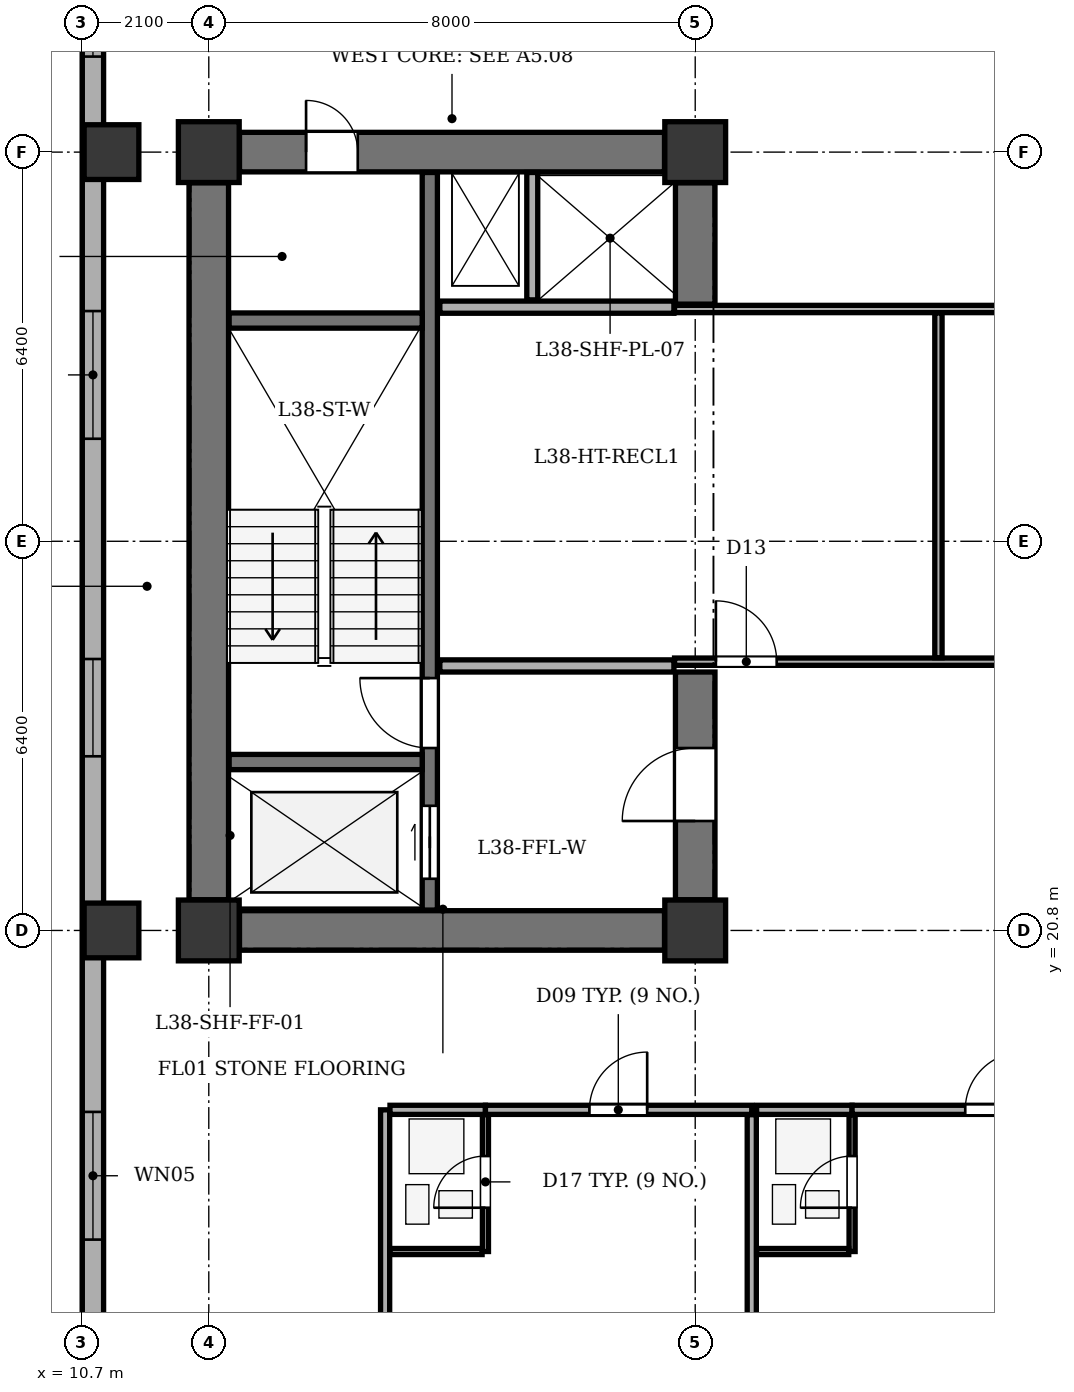
"""IFC4 building model, lengths in metres.
Left out: names, types, materials, properties, quantities, classifications, styles, units other than length and angle.
Written with IfcOpenShell. Run it as: python <this file> out.ifc"""

import sys

from ifc_helpers import new_model, si_unit, direction, frame, frame_2d, origin, origin_2d, place, context, subcontext, project, spatial, rectangle, extrude, element, fill, save


model = new_model("IFC4")
c1 = context("Model", 3, precision=1e-05, world=origin(), true_north=direction((0.0, 1.0)))
c2 = subcontext(c1, "Body", "Model", "MODEL_VIEW")
j1 = project(units=[si_unit("LENGTHUNIT", "METRE"), si_unit("PLANEANGLEUNIT", "RADIAN")], contexts=[c1])
p1 = place(None, origin())
s1 = spatial("IfcSite", under=j1, at=p1, CompositionType="ELEMENT")
p2 = place(p1, origin())
s2 = spatial("IfcBuilding", under=s1, at=p2, CompositionType="ELEMENT")
p3 = place(p2, frame((0.0, 0.0, 151.8)))
s3 = spatial("IfcBuildingStorey", under=s2, at=p3, CompositionType="ELEMENT", Elevation=151.8)
for number, where, z_axis, x_axis in (
    (1, (12.8, 20.8, 0.0), (0.0, 0.0, 1.0), (1.0, 0.0, 0.0)),
    (2, (20.8, 20.8, 0.0), (0.0, 0.0, 1.0), (1.0, 0.0, 0.0)),
    (3, (12.8, 33.6, 0.0), (0.0, 0.0, 1.0), (1.0, 0.0, 0.0)),
    (4, (20.8, 33.6, 0.0), (0.0, 0.0, 1.0), (1.0, 0.0, 0.0)),
):
    element("IfcColumn", number, at=place(p3, frame(where, z_axis=z_axis, x_axis=x_axis)), inside=s3, PredefinedType="COLUMN", context=c2, shape_type="SweptSolid", body=[
        extrude(rectangle(XDim=1.0, YDim=1.0, at=origin_2d()), origin(), (0.0, 0.0, 1.0), 3.5),
    ])
for number, where, z_axis, x_axis in (
    (5, (11.2, 20.8, 0.0), (0.0, 0.0, 1.0), (1.0, 0.0, 0.0)),
    (6, (11.2, 33.6, 0.0), (0.0, 0.0, 1.0), (1.0, 0.0, 0.0)),
):
    element("IfcColumn", number, at=place(p3, frame(where, z_axis=z_axis, x_axis=x_axis)), inside=s3, PredefinedType="COLUMN", context=c2, shape_type="SweptSolid", body=[
        extrude(rectangle(XDim=0.9, YDim=0.9, at=origin_2d()), origin(), (0.0, 0.0, 1.0), 3.5),
    ])
p4 = place(p3, frame((10.895, 6.5, 0.0), z_axis=(0.0, 0.0, 1.0), x_axis=(0.0, 1.0, 0.0)))
e7 = element("IfcWall", 7, at=p4, inside=s3, PredefinedType="STANDARD", context=c2, shape_type="SweptSolid", body=[
    extrude(rectangle(XDim=35.0, YDim=0.35, at=frame_2d((17.5, 0.0))), origin(), (0.0, 0.0, 1.0), 2.785),
])
p5 = place(p4, frame((3.31, 0.0, 0.75)))
e8 = element("IfcOpeningElement", 8, at=p5, cuts=e7, PredefinedType="OPENING", context=c2, shape_type="SweptSolid", body=[
    extrude(rectangle(XDim=1.6, YDim=1.75, at=frame_2d((0.8, 0.875))), frame((0.0, 0.185, 0.0), z_axis=(0.0, -1.0, 0.0), x_axis=(1.0, 0.0, 0.0)), (0.0, 0.0, 1.0), 0.37),
])
p6 = place(p4, frame((9.216, 0.0, 0.75)))
e9 = element("IfcOpeningElement", 9, at=p6, cuts=e7, PredefinedType="OPENING", context=c2, shape_type="SweptSolid", body=[
    extrude(rectangle(XDim=2.1, YDim=1.75, at=frame_2d((1.05, 0.875))), frame((0.0, 0.185, 0.0), z_axis=(0.0, -1.0, 0.0), x_axis=(1.0, 0.0, 0.0)), (0.0, 0.0, 1.0), 0.37),
])
p7 = place(p4, frame((17.164, 0.0, 0.75)))
e10 = element("IfcOpeningElement", 10, at=p7, cuts=e7, PredefinedType="OPENING", context=c2, shape_type="SweptSolid", body=[
    extrude(rectangle(XDim=1.6, YDim=1.75, at=frame_2d((0.8, 0.875))), frame((0.0, 0.185, 0.0), z_axis=(0.0, -1.0, 0.0), x_axis=(1.0, 0.0, 0.0)), (0.0, 0.0, 1.0), 0.37),
])
p8 = place(p4, frame((22.386, 0.0, 0.75)))
e11 = element("IfcOpeningElement", 11, at=p8, cuts=e7, PredefinedType="OPENING", context=c2, shape_type="SweptSolid", body=[
    extrude(rectangle(XDim=2.1, YDim=1.75, at=frame_2d((1.05, 0.875))), frame((0.0, 0.185, 0.0), z_axis=(0.0, -1.0, 0.0), x_axis=(1.0, 0.0, 0.0)), (0.0, 0.0, 1.0), 0.37),
])
p9 = place(p4, frame((28.671, 0.0, 0.75)))
e12 = element("IfcOpeningElement", 12, at=p9, cuts=e7, PredefinedType="OPENING", context=c2, shape_type="SweptSolid", body=[
    extrude(rectangle(XDim=1.6, YDim=1.75, at=frame_2d((0.8, 0.875))), frame((0.0, 0.185, 0.0), z_axis=(0.0, -1.0, 0.0), x_axis=(1.0, 0.0, 0.0)), (0.0, 0.0, 1.0), 0.37),
])
p10 = place(p4, frame((31.755, 0.0, 0.75)))
e13 = element("IfcOpeningElement", 13, at=p10, cuts=e7, PredefinedType="OPENING", context=c2, shape_type="SweptSolid", body=[
    extrude(rectangle(XDim=1.6, YDim=1.75, at=frame_2d((0.8, 0.875))), frame((0.0, 0.185, 0.0), z_axis=(0.0, -1.0, 0.0), x_axis=(1.0, 0.0, 0.0)), (0.0, 0.0, 1.0), 0.37),
])
p11 = place(p3, frame((12.8, 21.305, 0.0), z_axis=(0.0, 0.0, 1.0), x_axis=(0.0, 1.0, 0.0)))
e14 = element("IfcWall", 14, at=p11, inside=s3, PredefinedType="SHEAR", context=c2, shape_type="SweptSolid", body=[
    extrude(rectangle(XDim=11.79, YDim=0.65, at=frame_2d((5.895, 0.0))), origin(), (0.0, 0.0, 1.0), 3.2),
])
p12 = place(p3, frame((13.305, 20.8, 0.0), z_axis=(0.0, 0.0, 1.0), x_axis=(1.0, 0.0, 0.0)))
e15 = element("IfcWall", 15, at=p12, inside=s3, PredefinedType="SHEAR", context=c2, shape_type="SweptSolid", body=[
    extrude(rectangle(XDim=6.99, YDim=0.65, at=frame_2d((3.495, 0.0))), origin(), (0.0, 0.0, 1.0), 3.2),
])
p13 = place(p3, frame((13.305, 33.6, 0.0), z_axis=(0.0, 0.0, 1.0), x_axis=(1.0, 0.0, 0.0)))
e16 = element("IfcWall", 16, at=p13, inside=s3, PredefinedType="SHEAR", context=c2, shape_type="SweptSolid", body=[
    extrude(rectangle(XDim=6.99, YDim=0.65, at=frame_2d((3.495, 0.0))), origin(), (0.0, 0.0, 1.0), 3.2),
])
p14 = place(p13, frame((1.095, 0.0, 0.0)))
e17 = element("IfcOpeningElement", 17, at=p14, cuts=e16, PredefinedType="OPENING", context=c2, shape_type="SweptSolid", body=[
    extrude(rectangle(XDim=0.85, YDim=2.02, at=frame_2d((0.425, 1.01))), frame((0.0, 0.335, 0.0), z_axis=(0.0, -1.0, 0.0), x_axis=(1.0, 0.0, 0.0)), (0.0, 0.0, 1.0), 0.67),
])
p15 = place(p3, frame((20.8, 21.305, 0.0), z_axis=(0.0, 0.0, 1.0), x_axis=(0.0, 1.0, 0.0)))
e18 = element("IfcWall", 18, at=p15, inside=s3, PredefinedType="SHEAR", context=c2, shape_type="SweptSolid", body=[
    extrude(rectangle(XDim=3.745, YDim=0.65, at=frame_2d((1.873, 0.0))), origin(), (0.0, 0.0, 1.0), 3.2),
])
p16 = place(p15, frame((1.295, 0.0, 0.0)))
e19 = element("IfcOpeningElement", 19, at=p16, cuts=e18, PredefinedType="OPENING", context=c2, shape_type="SweptSolid", body=[
    extrude(rectangle(XDim=1.2, YDim=2.15, at=frame_2d((0.6, 1.075))), frame((0.0, 0.335, 0.0), z_axis=(0.0, -1.0, 0.0), x_axis=(1.0, 0.0, 0.0)), (0.0, 0.0, 1.0), 0.67),
])
p17 = place(p3, frame((20.8, 31.1, 0.0), z_axis=(0.0, 0.0, 1.0), x_axis=(0.0, 1.0, 0.0)))
e20 = element("IfcWall", 20, at=p17, inside=s3, PredefinedType="SHEAR", context=c2, shape_type="SweptSolid", body=[
    extrude(rectangle(XDim=1.995, YDim=0.65, at=frame_2d((0.998, 0.0))), origin(), (0.0, 0.0, 1.0), 3.2),
])
p18 = place(p3, frame((16.435, 21.135, 0.0), z_axis=(0.0, 0.0, 1.0), x_axis=(0.0, 1.0, 0.0)))
e21 = element("IfcWall", 21, at=p18, inside=s3, PredefinedType="SHEAR", context=c2, shape_type="SweptSolid", body=[
    extrude(rectangle(XDim=12.13, YDim=0.25, at=frame_2d((6.065, 0.0))), origin(), (0.0, 0.0, 1.0), 3.2),
])
p19 = place(p18, frame((0.515, 0.0, 0.0)))
e22 = element("IfcOpeningElement", 22, at=p19, cuts=e21, PredefinedType="OPENING", context=c2, shape_type="SweptSolid", body=[
    extrude(rectangle(XDim=1.2, YDim=2.15, at=frame_2d((0.6, 1.075))), frame((0.0, 0.135, 0.0), z_axis=(0.0, -1.0, 0.0), x_axis=(1.0, 0.0, 0.0)), (0.0, 0.0, 1.0), 0.27),
])
p20 = place(p18, frame((2.665, 0.0, 0.0)))
e23 = element("IfcOpeningElement", 23, at=p20, cuts=e21, PredefinedType="OPENING", context=c2, shape_type="SweptSolid", body=[
    extrude(rectangle(XDim=1.15, YDim=2.15, at=frame_2d((0.575, 1.075))), frame((0.0, 0.135, 0.0), z_axis=(0.0, -1.0, 0.0), x_axis=(1.0, 0.0, 0.0)), (0.0, 0.0, 1.0), 0.27),
])
for number, where, z_axis, x_axis in (
    (24, (13.135, 23.57, 0.0), (0.0, 0.0, 1.0), (1.0, 0.0, 0.0)),
    (25, (13.135, 30.83, 0.0), (0.0, 0.0, 1.0), (1.0, 0.0, 0.0)),
):
    element("IfcWall", number, at=place(p3, frame(where, z_axis=z_axis, x_axis=x_axis)), inside=s3, PredefinedType="SHEAR", context=c2, shape_type="SweptSolid", body=[
        extrude(rectangle(XDim=3.175, YDim=0.25, at=frame_2d((1.587, 0.0))), origin(), (0.0, 0.0, 1.0), 3.2),
    ])
for number, where, z_axis, x_axis in (
    (26, (16.6, 25.15, 0.0), (0.0, 0.0, 1.0), (1.0, 0.0, 0.0)),
    (27, (16.6, 31.05, 0.0), (0.0, 0.0, 1.0), (1.0, 0.0, 0.0)),
):
    element("IfcWall", number, at=place(p3, frame(where, z_axis=z_axis, x_axis=x_axis)), inside=s3, PredefinedType="SOLIDWALL", context=c2, shape_type="SweptSolid", body=[
        extrude(rectangle(XDim=3.85, YDim=0.2, at=frame_2d((1.925, 0.0))), origin(), (0.0, 0.0, 1.0), 3.2),
    ])
p21 = place(p3, frame((18.12, 31.17, 0.0), z_axis=(0.0, 0.0, 1.0), x_axis=(0.0, 1.0, 0.0)))
e28 = element("IfcWall", 28, at=p21, inside=s3, PredefinedType="PARTITIONING", context=c2, shape_type="SweptSolid", body=[
    extrude(rectangle(XDim=2.095, YDim=0.18, at=frame_2d((1.047, 0.0))), origin(), (0.0, 0.0, 1.0), 3.2),
])
p22 = place(p3, frame((20.46, 25.22, 0.0), z_axis=(0.0, 0.0, 1.0), x_axis=(1.0, 0.0, 0.0)))
e29 = element("IfcWall", 29, at=p22, inside=s3, PredefinedType="PARTITIONING", context=c2, shape_type="SweptSolid", body=[
    extrude(rectangle(XDim=11.94, YDim=0.12, at=frame_2d((5.97, 0.0))), origin(), (0.0, 0.0, 1.0), 3.2),
])
p23 = place(p22, frame((0.68, 0.0, 0.0)))
e30 = element("IfcOpeningElement", 30, at=p23, cuts=e29, PredefinedType="OPENING", context=c2, shape_type="SweptSolid", body=[
    extrude(rectangle(XDim=1.0, YDim=2.1, at=frame_2d((0.5, 1.05))), frame((0.0, 0.07, 0.0), z_axis=(0.0, -1.0, 0.0), x_axis=(1.0, 0.0, 0.0)), (0.0, 0.0, 1.0), 0.14),
])
p24 = place(p3, frame((20.46, 31.02, 0.0), z_axis=(0.0, 0.0, 1.0), x_axis=(1.0, 0.0, 0.0)))
e31 = element("IfcWall", 31, at=p24, inside=s3, PredefinedType="PARTITIONING", context=c2, shape_type="SweptSolid", body=[
    extrude(rectangle(XDim=11.94, YDim=0.12, at=frame_2d((5.97, 0.0))), origin(), (0.0, 0.0, 1.0), 3.2),
])
p25 = place(p3, frame((24.8, 25.285, 0.0), z_axis=(0.0, 0.0, 1.0), x_axis=(0.0, 1.0, 0.0)))
e32 = element("IfcWall", 32, at=p25, inside=s3, PredefinedType="PARTITIONING", context=c2, shape_type="SweptSolid", body=[
    extrude(rectangle(XDim=5.67, YDim=0.12, at=frame_2d((2.835, 0.0))), origin(), (0.0, 0.0, 1.0), 3.2),
])
p26 = place(p3, frame((15.7, 1.875, 0.0), z_axis=(0.0, 0.0, 1.0), x_axis=(0.0, 1.0, 0.0)))
e33 = element("IfcWall", 33, at=p26, inside=s3, PredefinedType="PARTITIONING", context=c2, shape_type="SweptSolid", body=[
    extrude(rectangle(XDim=15.975, YDim=0.15, at=frame_2d((7.988, 0.0))), origin(), (0.0, 0.0, 1.0), 3.2),
])
p27 = place(p3, frame((15.78, 17.85, 0.0), z_axis=(0.0, 0.0, 1.0), x_axis=(1.0, 0.0, 0.0)))
e34 = element("IfcWall", 34, at=p27, inside=s3, PredefinedType="PARTITIONING", context=c2, shape_type="SweptSolid", body=[
    extrude(rectangle(XDim=1.57, YDim=0.15, at=frame_2d((0.785, 0.0))), origin(), (0.0, 0.0, 1.0), 3.2),
])
p28 = place(p3, frame((17.35, 17.85, 0.0), z_axis=(0.0, 0.0, 1.0), x_axis=(1.0, 0.0, 0.0)))
e35 = element("IfcWall", 35, at=p28, inside=s3, PredefinedType="PARTITIONING", context=c2, shape_type="SweptSolid", body=[
    extrude(rectangle(XDim=4.38, YDim=0.15, at=frame_2d((2.19, 0.0))), origin(), (0.0, 0.0, 1.0), 3.2),
])
p29 = place(p28, frame((1.71, 0.0, 0.0)))
e36 = element("IfcOpeningElement", 36, at=p29, cuts=e35, PredefinedType="OPENING", context=c2, shape_type="SweptSolid", body=[
    extrude(rectangle(XDim=0.95, YDim=2.1, at=frame_2d((0.475, 1.05))), frame((0.0, 0.085, 0.0), z_axis=(0.0, -1.0, 0.0), x_axis=(1.0, 0.0, 0.0)), (0.0, 0.0, 1.0), 0.17),
])
p30 = place(p3, frame((17.35, 15.52, 0.0), z_axis=(0.0, 0.0, 1.0), x_axis=(0.0, 1.0, 0.0)))
e37 = element("IfcWall", 37, at=p30, inside=s3, PredefinedType="PARTITIONING", context=c2, shape_type="SweptSolid", body=[
    extrude(rectangle(XDim=2.25, YDim=0.1, at=frame_2d((1.125, 0.0))), origin(), (0.0, 0.0, 1.0), 3.2),
])
p31 = place(p30, frame((0.72, 0.0, 0.0)))
e38 = element("IfcOpeningElement", 38, at=p31, cuts=e37, PredefinedType="OPENING", context=c2, shape_type="SweptSolid", body=[
    extrude(rectangle(XDim=0.85, YDim=2.05, at=frame_2d((0.425, 1.025))), frame((0.0, 0.06, 0.0), z_axis=(0.0, -1.0, 0.0), x_axis=(1.0, 0.0, 0.0)), (0.0, 0.0, 1.0), 0.12),
])
p32 = place(p3, frame((15.78, 15.52, 0.0), z_axis=(0.0, 0.0, 1.0), x_axis=(1.0, 0.0, 0.0)))
e39 = element("IfcWall", 39, at=p32, inside=s3, PredefinedType="PARTITIONING", context=c2, shape_type="SweptSolid", body=[
    extrude(rectangle(XDim=1.515, YDim=0.1, at=frame_2d((0.757, 0.0))), origin(), (0.0, 0.0, 1.0), 3.2),
])
p33 = place(p3, frame((21.73, 1.875, 0.0), z_axis=(0.0, 0.0, 1.0), x_axis=(0.0, 1.0, 0.0)))
e40 = element("IfcWall", 40, at=p33, inside=s3, PredefinedType="PARTITIONING", context=c2, shape_type="SweptSolid", body=[
    extrude(rectangle(XDim=15.895, YDim=0.15, at=frame_2d((7.948, 0.0))), origin(), (0.0, 0.0, 1.0), 3.2),
])
p34 = place(p3, frame((21.81, 17.85, 0.0), z_axis=(0.0, 0.0, 1.0), x_axis=(1.0, 0.0, 0.0)))
e41 = element("IfcWall", 41, at=p34, inside=s3, PredefinedType="PARTITIONING", context=c2, shape_type="SweptSolid", body=[
    extrude(rectangle(XDim=1.57, YDim=0.15, at=frame_2d((0.785, 0.0))), origin(), (0.0, 0.0, 1.0), 3.2),
])
p35 = place(p3, frame((23.38, 17.85, 0.0), z_axis=(0.0, 0.0, 1.0), x_axis=(1.0, 0.0, 0.0)))
e42 = element("IfcWall", 42, at=p35, inside=s3, PredefinedType="PARTITIONING", context=c2, shape_type="SweptSolid", body=[
    extrude(rectangle(XDim=4.681, YDim=0.15, at=frame_2d((2.341, 0.0))), origin(), (0.0, 0.0, 1.0), 3.2),
])
p36 = place(p35, frame((1.861, 0.0, 0.0)))
e43 = element("IfcOpeningElement", 43, at=p36, cuts=e42, PredefinedType="OPENING", context=c2, shape_type="SweptSolid", body=[
    extrude(rectangle(XDim=0.95, YDim=2.1, at=frame_2d((0.475, 1.05))), frame((0.0, 0.085, 0.0), z_axis=(0.0, -1.0, 0.0), x_axis=(1.0, 0.0, 0.0)), (0.0, 0.0, 1.0), 0.17),
])
p37 = place(p3, frame((23.38, 15.52, 0.0), z_axis=(0.0, 0.0, 1.0), x_axis=(0.0, 1.0, 0.0)))
e44 = element("IfcWall", 44, at=p37, inside=s3, PredefinedType="PARTITIONING", context=c2, shape_type="SweptSolid", body=[
    extrude(rectangle(XDim=2.25, YDim=0.1, at=frame_2d((1.125, 0.0))), origin(), (0.0, 0.0, 1.0), 3.2),
])
p38 = place(p37, frame((0.72, 0.0, 0.0)))
e45 = element("IfcOpeningElement", 45, at=p38, cuts=e44, PredefinedType="OPENING", context=c2, shape_type="SweptSolid", body=[
    extrude(rectangle(XDim=0.85, YDim=2.05, at=frame_2d((0.425, 1.025))), frame((0.0, 0.06, 0.0), z_axis=(0.0, -1.0, 0.0), x_axis=(1.0, 0.0, 0.0)), (0.0, 0.0, 1.0), 0.12),
])
p39 = place(p3, frame((21.81, 15.52, 0.0), z_axis=(0.0, 0.0, 1.0), x_axis=(1.0, 0.0, 0.0)))
e46 = element("IfcWall", 46, at=p39, inside=s3, PredefinedType="PARTITIONING", context=c2, shape_type="SweptSolid", body=[
    extrude(rectangle(XDim=1.515, YDim=0.1, at=frame_2d((0.757, 0.0))), origin(), (0.0, 0.0, 1.0), 3.2),
])
p40 = place(p6, origin())
e47 = element("IfcWindow", 47, at=p40, inside=s3, PartitioningType="SINGLE_PANEL", PredefinedType="WINDOW", context=c2, shape_type="SweptSolid", body=[
    extrude(rectangle(XDim=2.1, YDim=1.75, at=frame_2d((1.05, 0.875))), frame((0.0, -0.01, 0.0), z_axis=(0.0, -1.0, 0.0), x_axis=(1.0, 0.0, 0.0)), (0.0, 0.0, 1.0), 0.06),
])
fill(e9, e47)
p41 = place(p7, origin())
e48 = element("IfcWindow", 48, at=p41, inside=s3, PartitioningType="SINGLE_PANEL", PredefinedType="WINDOW", context=c2, shape_type="SweptSolid", body=[
    extrude(rectangle(XDim=1.6, YDim=1.75, at=frame_2d((0.8, 0.875))), frame((0.0, -0.01, 0.0), z_axis=(0.0, -1.0, 0.0), x_axis=(1.0, 0.0, 0.0)), (0.0, 0.0, 1.0), 0.06),
])
fill(e10, e48)
p42 = place(p8, origin())
e49 = element("IfcWindow", 49, at=p42, inside=s3, PartitioningType="SINGLE_PANEL", PredefinedType="WINDOW", context=c2, shape_type="SweptSolid", body=[
    extrude(rectangle(XDim=2.1, YDim=1.75, at=frame_2d((1.05, 0.875))), frame((0.0, -0.01, 0.0), z_axis=(0.0, -1.0, 0.0), x_axis=(1.0, 0.0, 0.0)), (0.0, 0.0, 1.0), 0.06),
])
fill(e11, e49)
p43 = place(p9, origin())
e50 = element("IfcWindow", 50, at=p43, inside=s3, PartitioningType="SINGLE_PANEL", PredefinedType="WINDOW", context=c2, shape_type="SweptSolid", body=[
    extrude(rectangle(XDim=1.6, YDim=1.75, at=frame_2d((0.8, 0.875))), frame((0.0, -0.01, 0.0), z_axis=(0.0, -1.0, 0.0), x_axis=(1.0, 0.0, 0.0)), (0.0, 0.0, 1.0), 0.06),
])
fill(e12, e50)
p44 = place(p14, origin())
e51 = element("IfcDoor", 51, at=p44, inside=s3, OperationType="SINGLE_SWING_LEFT", PredefinedType="DOOR", context=c2, shape_type="SweptSolid", body=[
    extrude(rectangle(XDim=0.85, YDim=2.02, at=frame_2d((0.425, 1.01))), frame((0.0, 0.025, 0.0), z_axis=(0.0, -1.0, 0.0), x_axis=(1.0, 0.0, 0.0)), (0.0, 0.0, 1.0), 0.05),
])
fill(e17, e51)
p45 = place(p16, origin())
e52 = element("IfcDoor", 52, at=p45, inside=s3, OperationType="SINGLE_SWING_LEFT", PredefinedType="DOOR", context=c2, shape_type="SweptSolid", body=[
    extrude(rectangle(XDim=1.2, YDim=2.15, at=frame_2d((0.6, 1.075))), frame((0.0, 0.025, 0.0), z_axis=(0.0, -1.0, 0.0), x_axis=(1.0, 0.0, 0.0)), (0.0, 0.0, 1.0), 0.05),
])
fill(e19, e52)
p46 = place(p19, origin())
e53 = element("IfcDoor", 53, at=p46, inside=s3, OperationType="DOUBLE_DOOR_SLIDING", PredefinedType="DOOR", context=c2, shape_type="SweptSolid", body=[
    extrude(rectangle(XDim=1.2, YDim=2.15, at=frame_2d((0.6, 1.075))), frame((0.0, 0.025, 0.0), z_axis=(0.0, -1.0, 0.0), x_axis=(1.0, 0.0, 0.0)), (0.0, 0.0, 1.0), 0.05),
])
fill(e22, e53)
p47 = place(p20, origin())
e54 = element("IfcDoor", 54, at=p47, inside=s3, OperationType="SINGLE_SWING_RIGHT", PredefinedType="DOOR", context=c2, shape_type="SweptSolid", body=[
    extrude(rectangle(XDim=1.15, YDim=2.15, at=frame_2d((0.575, 1.075))), frame((0.0, 0.025, 0.0), z_axis=(0.0, -1.0, 0.0), x_axis=(1.0, 0.0, 0.0)), (0.0, 0.0, 1.0), 0.05),
])
fill(e23, e54)
p48 = place(p23, origin())
e55 = element("IfcDoor", 55, at=p48, inside=s3, OperationType="SINGLE_SWING_LEFT", PredefinedType="DOOR", context=c2, shape_type="SweptSolid", body=[
    extrude(rectangle(XDim=1.0, YDim=2.1, at=frame_2d((0.5, 1.05))), frame((0.0, 0.025, 0.0), z_axis=(0.0, -1.0, 0.0), x_axis=(1.0, 0.0, 0.0)), (0.0, 0.0, 1.0), 0.05),
])
fill(e30, e55)
p49 = place(p31, origin())
e56 = element("IfcDoor", 56, at=p49, inside=s3, OperationType="SINGLE_SWING_LEFT", PredefinedType="DOOR", context=c2, shape_type="SweptSolid", body=[
    extrude(rectangle(XDim=0.85, YDim=2.05, at=frame_2d((0.425, 1.025))), frame((0.0, 0.025, 0.0), z_axis=(0.0, -1.0, 0.0), x_axis=(1.0, 0.0, 0.0)), (0.0, 0.0, 1.0), 0.05),
])
fill(e38, e56)
p50 = place(p29, origin())
e57 = element("IfcDoor", 57, at=p50, inside=s3, OperationType="SINGLE_SWING_RIGHT", PredefinedType="DOOR", context=c2, shape_type="SweptSolid", body=[
    extrude(rectangle(XDim=0.95, YDim=2.1, at=frame_2d((0.475, 1.05))), frame((0.0, 0.025, 0.0), z_axis=(0.0, -1.0, 0.0), x_axis=(1.0, 0.0, 0.0)), (0.0, 0.0, 1.0), 0.05),
])
fill(e36, e57)
p51 = place(p38, origin())
e58 = element("IfcDoor", 58, at=p51, inside=s3, OperationType="SINGLE_SWING_LEFT", PredefinedType="DOOR", context=c2, shape_type="SweptSolid", body=[
    extrude(rectangle(XDim=0.85, YDim=2.05, at=frame_2d((0.425, 1.025))), frame((0.0, 0.025, 0.0), z_axis=(0.0, -1.0, 0.0), x_axis=(1.0, 0.0, 0.0)), (0.0, 0.0, 1.0), 0.05),
])
fill(e45, e58)
p52 = place(p36, origin())
e59 = element("IfcDoor", 59, at=p52, inside=s3, OperationType="SINGLE_SWING_RIGHT", PredefinedType="DOOR", context=c2, shape_type="SweptSolid", body=[
    extrude(rectangle(XDim=0.95, YDim=2.1, at=frame_2d((0.475, 1.05))), frame((0.0, 0.025, 0.0), z_axis=(0.0, -1.0, 0.0), x_axis=(1.0, 0.0, 0.0)), (0.0, 0.0, 1.0), 0.05),
])
fill(e43, e59)
save(model, sys.argv[1])
